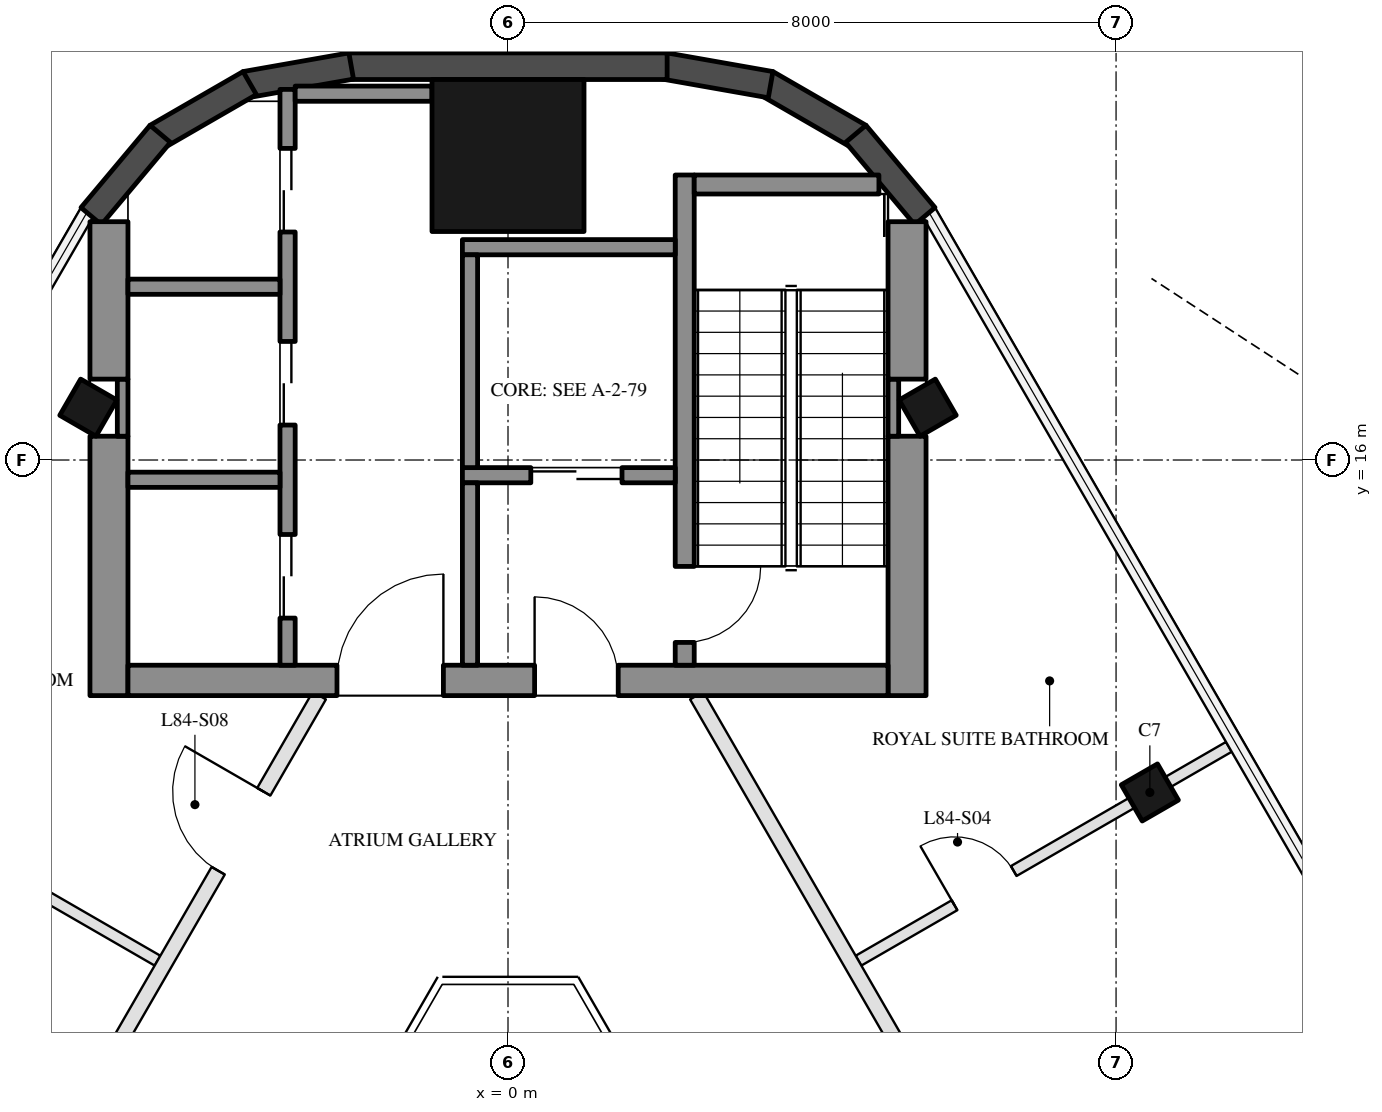
"""IFC4 building model, lengths in metres.
Left out: names, types, materials, properties, quantities, classifications, styles, units other than length and angle.
Written with IfcOpenShell. Run it as: python <this file> out.ifc"""

import sys

from ifc_helpers import new_model, si_unit, direction, frame, frame_2d, origin, origin_2d, place, context, subcontext, project, spatial, rectangle, hollow_rectangle, extrude, boolean, halfspace, element, fill, save


model = new_model("IFC4")
c1 = context("Model", 3, precision=1e-05, world=origin(), true_north=direction((0.0, 1.0)))
c2 = subcontext(c1, "Body", "Model", "MODEL_VIEW")
j1 = project(units=[si_unit("LENGTHUNIT", "METRE"), si_unit("PLANEANGLEUNIT", "RADIAN")], contexts=[c1])
p1 = place(None, origin())
s1 = spatial("IfcSite", under=j1, at=p1, CompositionType="ELEMENT")
p2 = place(p1, origin())
s2 = spatial("IfcBuilding", under=s1, at=p2, CompositionType="ELEMENT")
p3 = place(p2, frame((0.0, 0.0, 338.3)))
s3 = spatial("IfcBuildingStorey", under=s2, at=p3, CompositionType="ELEMENT", Elevation=338.3)
p4 = place(p3, frame((8.445, 11.626, 0.0), z_axis=(0.0, 0.0, 1.0), x_axis=(-0.5, 0.866025403784, 0.0)))
e1 = element("IfcColumn", 1, at=p4, inside=s3, PredefinedType="COLUMN", context=c2, shape_type="SweptSolid", body=[
    boolean("DIFFERENCE", extrude(hollow_rectangle(XDim=0.55, YDim=0.55, WallThickness=0.025, at=origin_2d()), origin(), (0.0, 0.0, 1.0), 5.0), halfspace(frame((0.0, 0.0, 0.02), z_axis=(0.0, 0.0, 1.0), x_axis=(1.0, 0.0, 0.0)), True)),
])
for number, where, z_axis, x_axis in (
    (2, (5.521, 16.689, 0.0), (0.0, 0.0, 1.0), (-0.5, 0.866, 0.0)),
    (3, (-5.521, 16.689, 0.0), (0.0, 0.0, 1.0), (0.5, 0.866, 0.0)),
):
    element("IfcColumn", number, at=place(p3, frame(where, z_axis=z_axis, x_axis=x_axis)), inside=s3, PredefinedType="COLUMN", context=c2, shape_type="SweptSolid", body=[
        boolean("DIFFERENCE", extrude(hollow_rectangle(XDim=0.55, YDim=0.55, WallThickness=0.025, at=origin_2d()), origin(), (0.0, 0.0, 1.0), 5.0), halfspace(frame((0.0, 0.0, 0.024), z_axis=(0.0, 0.0, 1.0), x_axis=(1.0, 0.0, 0.0)), True)),
    ])
p5 = place(p3, frame((0.0, 20.006, 0.0), z_axis=(0.0, 0.0, 1.0), x_axis=(1.0, 0.0, 0.0)))
e4 = element("IfcColumn", 4, at=p5, inside=s3, PredefinedType="COLUMN", context=c2, shape_type="SweptSolid", body=[
    boolean("DIFFERENCE", extrude(hollow_rectangle(XDim=2.0, YDim=2.0, WallThickness=0.05, at=origin_2d()), origin(), (0.0, 0.0, 1.0), 5.0), halfspace(frame((0.0, 0.0, 0.066), z_axis=(0.0, 0.0, 1.0), x_axis=(1.0, 0.0, 0.0)), True)),
])
for number, where, z_axis, x_axis in (
    (5, (4.622, 20.253, 0.0), (0.0, 0.0, 1.0), (-0.866, 0.5, 0.0)),
    (6, (3.455, 20.939, 0.0), (0.0, 0.0, 1.0), (-0.985, 0.174, 0.0)),
):
    element("IfcWall", number, at=place(p3, frame(where, z_axis=z_axis, x_axis=x_axis)), inside=s3, PredefinedType="SOLIDWALL", context=c2, shape_type="SweptSolid", body=[
        extrude(rectangle(XDim=1.414, YDim=0.35, at=frame_2d((0.707, 0.0))), origin(), (0.0, 0.0, 1.0), 4.8),
    ])
p6 = place(p3, frame((2.094, 21.181, 0.0), z_axis=(0.0, 0.0, 1.0), x_axis=(-1.0, 0.0, 0.0)))
e7 = element("IfcWall", 7, at=p6, inside=s3, PredefinedType="SOLIDWALL", context=c2, shape_type="SweptSolid", body=[
    extrude(rectangle(XDim=4.187, YDim=0.35, at=frame_2d((2.094, 0.0))), origin(), (0.0, 0.0, 1.0), 4.8),
])
for number, where, z_axis, x_axis in (
    (8, (-2.063, 21.184, 0.0), (0.0, 0.0, 1.0), (-0.985, -0.174, 0.0)),
    (9, (-3.398, 20.959, 0.0), (0.0, 0.0, 1.0), (-0.866, -0.5, 0.0)),
):
    element("IfcWall", number, at=place(p3, frame(where, z_axis=z_axis, x_axis=x_axis)), inside=s3, PredefinedType="SOLIDWALL", context=c2, shape_type="SweptSolid", body=[
        extrude(rectangle(XDim=1.414, YDim=0.35, at=frame_2d((0.707, 0.0))), origin(), (0.0, 0.0, 1.0), 4.8),
    ])
for number, where, z_axis, x_axis in (
    (10, (-4.576, 20.292, 0.0), (0.0, 0.0, 1.0), (-0.643, -0.766, 0.0)),
    (11, (5.484, 19.209, 0.0), (0.0, 0.0, 1.0), (-0.643, 0.766, 0.0)),
):
    element("IfcWall", number, at=place(p3, frame(where, z_axis=z_axis, x_axis=x_axis)), inside=s3, PredefinedType="SOLIDWALL", context=c2, shape_type="SweptSolid", body=[
        extrude(rectangle(XDim=1.413, YDim=0.35, at=frame_2d((0.707, 0.0))), origin(), (0.0, 0.0, 1.0), 4.8),
    ])
p7 = place(p3, frame((5.25, 12.9, 0.0), z_axis=(0.0, 0.0, 1.0), x_axis=(0.0, 1.0, 0.0)))
e12 = element("IfcWall", 12, at=p7, inside=s3, PredefinedType="SHEAR", context=c2, shape_type="SweptSolid", body=[
    extrude(rectangle(XDim=3.413, YDim=0.5, at=frame_2d((1.707, 0.0))), origin(), (0.0, 0.0, 1.0), 4.8),
])
p8 = place(p3, frame((5.07, 16.313, 0.0), z_axis=(0.0, 0.0, 1.0), x_axis=(0.0, 1.0, 0.0)))
e13 = element("IfcWall", 13, at=p8, inside=s3, PredefinedType="SHEAR", context=c2, shape_type="SweptSolid", body=[
    extrude(rectangle(XDim=0.751, YDim=0.14, at=frame_2d((0.376, 0.0))), origin(), (0.0, 0.0, 1.0), 4.8),
])
p9 = place(p3, frame((5.25, 17.064, 0.0), z_axis=(0.0, 0.0, 1.0), x_axis=(0.0, 1.0, 0.0)))
e14 = element("IfcWall", 14, at=p9, inside=s3, PredefinedType="SHEAR", context=c2, shape_type="SweptSolid", body=[
    extrude(rectangle(XDim=2.071, YDim=0.5, at=frame_2d((1.036, 0.0))), origin(), (0.0, 0.0, 1.0), 4.8),
])
p10 = place(p3, frame((-5.25, 12.9, 0.0), z_axis=(0.0, 0.0, 1.0), x_axis=(0.0, 1.0, 0.0)))
e15 = element("IfcWall", 15, at=p10, inside=s3, PredefinedType="SHEAR", context=c2, shape_type="SweptSolid", body=[
    extrude(rectangle(XDim=3.413, YDim=0.5, at=frame_2d((1.707, 0.0))), origin(), (0.0, 0.0, 1.0), 4.8),
])
p11 = place(p3, frame((-5.07, 16.313, 0.0), z_axis=(0.0, 0.0, 1.0), x_axis=(0.0, 1.0, 0.0)))
e16 = element("IfcWall", 16, at=p11, inside=s3, PredefinedType="SHEAR", context=c2, shape_type="SweptSolid", body=[
    extrude(rectangle(XDim=0.751, YDim=0.14, at=frame_2d((0.376, 0.0))), origin(), (0.0, 0.0, 1.0), 4.8),
])
p12 = place(p3, frame((-5.25, 17.064, 0.0), z_axis=(0.0, 0.0, 1.0), x_axis=(0.0, 1.0, 0.0)))
e17 = element("IfcWall", 17, at=p12, inside=s3, PredefinedType="SHEAR", context=c2, shape_type="SweptSolid", body=[
    extrude(rectangle(XDim=2.071, YDim=0.5, at=frame_2d((1.036, 0.0))), origin(), (0.0, 0.0, 1.0), 4.8),
])
p13 = place(p3, frame((5.0, 13.1, 0.0), z_axis=(0.0, 0.0, 1.0), x_axis=(-1.0, 0.0, 0.0)))
e18 = element("IfcWall", 18, at=p13, inside=s3, PredefinedType="SHEAR", context=c2, shape_type="SweptSolid", body=[
    extrude(rectangle(XDim=10.0, YDim=0.4, at=frame_2d((5.0, 0.0))), origin(), (0.0, 0.0, 1.0), 4.8),
])
p14 = place(p13, frame((3.55, 0.0, 0.0)))
e19 = element("IfcOpeningElement", 19, at=p14, cuts=e18, PredefinedType="OPENING", context=c2, shape_type="SweptSolid", body=[
    extrude(rectangle(XDim=1.1, YDim=2.1, at=frame_2d((0.55, 1.05))), frame((0.0, 0.21, 0.0), z_axis=(0.0, -1.0, 0.0), x_axis=(1.0, 0.0, 0.0)), (0.0, 0.0, 1.0), 0.42),
])
p15 = place(p13, frame((5.85, 0.0, 0.0)))
e20 = element("IfcOpeningElement", 20, at=p15, cuts=e18, PredefinedType="OPENING", context=c2, shape_type="SweptSolid", body=[
    extrude(rectangle(XDim=1.4, YDim=2.1, at=frame_2d((0.7, 1.05))), frame((0.0, 0.21, 0.0), z_axis=(0.0, -1.0, 0.0), x_axis=(1.0, 0.0, 0.0)), (0.0, 0.0, 1.0), 0.42),
])
p16 = place(p3, frame((2.325, 13.3, 0.0), z_axis=(0.0, 0.0, 1.0), x_axis=(0.0, 1.0, 0.0)))
e21 = element("IfcWall", 21, at=p16, inside=s3, PredefinedType="SHEAR", context=c2, shape_type="SweptSolid", body=[
    extrude(rectangle(XDim=6.45, YDim=0.25, at=frame_2d((3.225, 0.0))), origin(), (0.0, 0.0, 1.0), 4.8),
])
p17 = place(p16, frame((0.3, 0.0, 0.0)))
e22 = element("IfcOpeningElement", 22, at=p17, cuts=e21, PredefinedType="OPENING", context=c2, shape_type="SweptSolid", body=[
    extrude(rectangle(XDim=1.0, YDim=2.1, at=frame_2d((0.5, 1.05))), frame((0.0, 0.135, 0.0), z_axis=(0.0, -1.0, 0.0), x_axis=(1.0, 0.0, 0.0)), (0.0, 0.0, 1.0), 0.27),
])
p18 = place(p3, frame((4.88, 19.625, 0.0), z_axis=(0.0, 0.0, 1.0), x_axis=(-1.0, 0.0, 0.0)))
e23 = element("IfcWall", 23, at=p18, inside=s3, PredefinedType="SHEAR", context=c2, shape_type="SweptSolid", body=[
    extrude(rectangle(XDim=2.43, YDim=0.25, at=frame_2d((1.215, 0.0))), origin(), (0.0, 0.0, 1.0), 4.8),
])
p19 = place(p3, frame((2.2, 18.8, 0.0), z_axis=(0.0, 0.0, 1.0), x_axis=(-1.0, 0.0, 0.0)))
e24 = element("IfcWall", 24, at=p19, inside=s3, PredefinedType="SHEAR", context=c2, shape_type="SweptSolid", body=[
    extrude(rectangle(XDim=2.8, YDim=0.2, at=frame_2d((1.4, 0.0))), origin(), (0.0, 0.0, 1.0), 4.8),
])
p20 = place(p3, frame((2.2, 15.8, 0.0), z_axis=(0.0, 0.0, 1.0), x_axis=(-1.0, 0.0, 0.0)))
e25 = element("IfcWall", 25, at=p20, inside=s3, PredefinedType="SHEAR", context=c2, shape_type="SweptSolid", body=[
    extrude(rectangle(XDim=2.8, YDim=0.2, at=frame_2d((1.4, 0.0))), origin(), (0.0, 0.0, 1.0), 4.8),
])
p21 = place(p20, frame((0.7, 0.0, 0.0)))
e26 = element("IfcOpeningElement", 26, at=p21, cuts=e25, PredefinedType="OPENING", context=c2, shape_type="SweptSolid", body=[
    extrude(rectangle(XDim=1.2, YDim=2.1, at=frame_2d((0.6, 1.05))), frame((0.0, 0.11, 0.0), z_axis=(0.0, -1.0, 0.0), x_axis=(1.0, 0.0, 0.0)), (0.0, 0.0, 1.0), 0.22),
])
p22 = place(p3, frame((-0.5, 15.9, 0.0), z_axis=(0.0, 0.0, 1.0), x_axis=(0.0, 1.0, 0.0)))
e27 = element("IfcWall", 27, at=p22, inside=s3, PredefinedType="SHEAR", context=c2, shape_type="SweptSolid", body=[
    extrude(rectangle(XDim=2.8, YDim=0.2, at=frame_2d((1.4, 0.0))), origin(), (0.0, 0.0, 1.0), 4.8),
])
p23 = place(p3, frame((-0.5, 13.3, 0.0), z_axis=(0.0, 0.0, 1.0), x_axis=(0.0, 1.0, 0.0)))
e28 = element("IfcWall", 28, at=p23, inside=s3, PredefinedType="SHEAR", context=c2, shape_type="SweptSolid", body=[
    extrude(rectangle(XDim=2.4, YDim=0.2, at=frame_2d((1.2, 0.0))), origin(), (0.0, 0.0, 1.0), 4.8),
])
p24 = place(p3, frame((-2.9, 13.3, 0.0), z_axis=(0.0, 0.0, 1.0), x_axis=(0.0, 1.0, 0.0)))
e29 = element("IfcWall", 29, at=p24, inside=s3, PredefinedType="SHEAR", context=c2, shape_type="SweptSolid", body=[
    extrude(rectangle(XDim=7.576, YDim=0.2, at=frame_2d((3.788, 0.0))), origin(), (0.0, 0.0, 1.0), 4.8),
])
p25 = place(p24, frame((0.62, 0.0, 0.0)))
e30 = element("IfcOpeningElement", 30, at=p25, cuts=e29, PredefinedType="OPENING", context=c2, shape_type="SweptSolid", body=[
    extrude(rectangle(XDim=1.1, YDim=2.1, at=frame_2d((0.55, 1.05))), frame((0.0, 0.11, 0.0), z_axis=(0.0, -1.0, 0.0), x_axis=(1.0, 0.0, 0.0)), (0.0, 0.0, 1.0), 0.22),
])
p26 = place(p24, frame((3.16, 0.0, 0.0)))
e31 = element("IfcOpeningElement", 31, at=p26, cuts=e29, PredefinedType="OPENING", context=c2, shape_type="SweptSolid", body=[
    extrude(rectangle(XDim=1.1, YDim=2.1, at=frame_2d((0.55, 1.05))), frame((0.0, 0.11, 0.0), z_axis=(0.0, -1.0, 0.0), x_axis=(1.0, 0.0, 0.0)), (0.0, 0.0, 1.0), 0.22),
])
p27 = place(p24, frame((5.7, 0.0, 0.0)))
e32 = element("IfcOpeningElement", 32, at=p27, cuts=e29, PredefinedType="OPENING", context=c2, shape_type="SweptSolid", body=[
    extrude(rectangle(XDim=1.1, YDim=2.1, at=frame_2d((0.55, 1.05))), frame((0.0, 0.11, 0.0), z_axis=(0.0, -1.0, 0.0), x_axis=(1.0, 0.0, 0.0)), (0.0, 0.0, 1.0), 0.22),
])
p28 = place(p3, frame((-1.0, 20.82, 0.0), z_axis=(0.0, 0.0, 1.0), x_axis=(-1.0, 0.0, 0.0)))
e33 = element("IfcWall", 33, at=p28, inside=s3, PredefinedType="SHEAR", context=c2, shape_type="SweptSolid", body=[
    extrude(rectangle(XDim=1.8, YDim=0.2, at=frame_2d((0.9, 0.0))), origin(), (0.0, 0.0, 1.0), 4.8),
])
for number, where, z_axis, x_axis in (
    (34, (-3.0, 15.74, 0.0), (0.0, 0.0, 1.0), (-1.0, 0.0, 0.0)),
    (35, (-3.0, 18.28, 0.0), (0.0, 0.0, 1.0), (-1.0, 0.0, 0.0)),
):
    element("IfcWall", number, at=place(p3, frame(where, z_axis=z_axis, x_axis=x_axis)), inside=s3, PredefinedType="SHEAR", context=c2, shape_type="SweptSolid", body=[
        extrude(rectangle(XDim=2.0, YDim=0.2, at=frame_2d((1.0, 0.0))), origin(), (0.0, 0.0, 1.0), 4.8),
    ])
p29 = place(p3, frame((9.484, 12.226, 0.0), z_axis=(0.0, 0.0, 1.0), x_axis=(-0.866039621134, -0.49997537402, 0.0)))
e36 = element("IfcWall", 36, at=p29, inside=s3, PredefinedType="PARTITIONING", context=c2, shape_type="SweptSolid", body=[
    extrude(rectangle(XDim=5.626, YDim=0.15, at=frame_2d((2.813, 0.0))), origin(), (0.0, 0.0, 1.0), 4.4),
])
p30 = place(p29, frame((3.268, 0.0, 0.0)))
e37 = element("IfcOpeningElement", 37, at=p30, cuts=e36, PredefinedType="OPENING", context=c2, shape_type="SweptSolid", body=[
    extrude(rectangle(XDim=0.9, YDim=2.1, at=frame_2d((0.45, 1.05))), frame((0.0, 0.085, 0.0), z_axis=(0.0, -1.0, 0.0), x_axis=(1.0, 0.0, 0.0)), (0.0, 0.0, 1.0), 0.17),
])
p31 = place(p3, frame((12.413, -4.3, 0.0), z_axis=(0.0, 0.0, 1.0), x_axis=(-0.50000478328, 0.866022642139, 0.0)))
e38 = element("IfcWall", 38, at=p31, inside=s3, PredefinedType="PARTITIONING", context=c2, shape_type="SweptSolid", body=[
    extrude(rectangle(XDim=19.861, YDim=0.2, at=frame_2d((9.931, 0.0))), origin(), (0.0, 0.0, 1.0), 4.4),
])
p32 = place(p31, frame((4.384, 0.0, 0.0)))
e39 = element("IfcOpeningElement", 39, at=p32, cuts=e38, PredefinedType="OPENING", context=c2, shape_type="SweptSolid", body=[
    extrude(rectangle(XDim=1.2, YDim=2.1, at=frame_2d((0.6, 1.05))), frame((0.0, 0.11, 0.0), z_axis=(0.0, -1.0, 0.0), x_axis=(1.0, 0.0, 0.0)), (0.0, 0.0, 1.0), 0.22),
])
p33 = place(p31, frame((12.354, 0.0, 0.0)))
e40 = element("IfcOpeningElement", 40, at=p33, cuts=e38, PredefinedType="OPENING", context=c2, shape_type="SweptSolid", body=[
    extrude(rectangle(XDim=1.0, YDim=2.1, at=frame_2d((0.5, 1.05))), frame((0.0, 0.11, 0.0), z_axis=(0.0, -1.0, 0.0), x_axis=(1.0, 0.0, 0.0)), (0.0, 0.0, 1.0), 0.22),
])
p34 = place(p3, frame((-9.484, 12.226, 0.0), z_axis=(0.0, 0.0, 1.0), x_axis=(0.866039621134, -0.49997537402, 0.0)))
e41 = element("IfcWall", 41, at=p34, inside=s3, PredefinedType="PARTITIONING", context=c2, shape_type="SweptSolid", body=[
    extrude(rectangle(XDim=5.626, YDim=0.15, at=frame_2d((2.813, 0.0))), origin(), (0.0, 0.0, 1.0), 4.4),
])
p35 = place(p3, frame((-2.482, 12.9, 0.0), z_axis=(0.0, 0.0, 1.0), x_axis=(-0.50000478328, -0.866022642139, 0.0)))
e42 = element("IfcWall", 42, at=p35, inside=s3, PredefinedType="PARTITIONING", context=c2, shape_type="SweptSolid", body=[
    extrude(rectangle(XDim=19.861, YDim=0.2, at=frame_2d((9.931, 0.0))), origin(), (0.0, 0.0, 1.0), 4.4),
])
p36 = place(p35, frame((1.461, 0.0, 0.0)))
e43 = element("IfcOpeningElement", 43, at=p36, cuts=e42, PredefinedType="OPENING", context=c2, shape_type="SweptSolid", body=[
    extrude(rectangle(XDim=1.2, YDim=2.1, at=frame_2d((0.6, 1.05))), frame((0.0, 0.11, 0.0), z_axis=(0.0, -1.0, 0.0), x_axis=(1.0, 0.0, 0.0)), (0.0, 0.0, 1.0), 0.22),
])
p37 = place(p35, frame((15.778, 0.0, 0.0)))
e44 = element("IfcOpeningElement", 44, at=p37, cuts=e42, PredefinedType="OPENING", context=c2, shape_type="SweptSolid", body=[
    extrude(rectangle(XDim=1.2, YDim=2.1, at=frame_2d((0.6, 1.05))), frame((0.0, 0.11, 0.0), z_axis=(0.0, -1.0, 0.0), x_axis=(1.0, 0.0, 0.0)), (0.0, 0.0, 1.0), 0.22),
])
p38 = place(p35, frame((8.008, 0.0, 0.0)))
e45 = element("IfcOpeningElement", 45, at=p38, cuts=e42, PredefinedType="OPENING", context=c2, shape_type="SweptSolid", body=[
    extrude(rectangle(XDim=1.0, YDim=2.1, at=frame_2d((0.5, 1.05))), frame((0.0, 0.11, 0.0), z_axis=(0.0, -1.0, 0.0), x_axis=(1.0, 0.0, 0.0)), (0.0, 0.0, 1.0), 0.22),
])
p39 = place(p21, origin())
e46 = element("IfcDoor", 46, at=p39, inside=s3, OperationType="DOUBLE_DOOR_SLIDING", PredefinedType="DOOR", context=c2, shape_type="SweptSolid", body=[
    extrude(rectangle(XDim=1.2, YDim=2.1, at=frame_2d((0.6, 1.05))), frame((0.0, 0.025, 0.0), z_axis=(0.0, -1.0, 0.0), x_axis=(1.0, 0.0, 0.0)), (0.0, 0.0, 1.0), 0.05),
])
fill(e26, e46)
p40 = place(p25, origin())
e47 = element("IfcDoor", 47, at=p40, inside=s3, OperationType="DOUBLE_DOOR_SLIDING", PredefinedType="DOOR", context=c2, shape_type="SweptSolid", body=[
    extrude(rectangle(XDim=1.1, YDim=2.1, at=frame_2d((0.55, 1.05))), frame((0.0, 0.025, 0.0), z_axis=(0.0, -1.0, 0.0), x_axis=(1.0, 0.0, 0.0)), (0.0, 0.0, 1.0), 0.05),
])
fill(e30, e47)
p41 = place(p26, origin())
e48 = element("IfcDoor", 48, at=p41, inside=s3, OperationType="DOUBLE_DOOR_SLIDING", PredefinedType="DOOR", context=c2, shape_type="SweptSolid", body=[
    extrude(rectangle(XDim=1.1, YDim=2.1, at=frame_2d((0.55, 1.05))), frame((0.0, 0.025, 0.0), z_axis=(0.0, -1.0, 0.0), x_axis=(1.0, 0.0, 0.0)), (0.0, 0.0, 1.0), 0.05),
])
fill(e31, e48)
p42 = place(p27, origin())
e49 = element("IfcDoor", 49, at=p42, inside=s3, OperationType="DOUBLE_DOOR_SLIDING", PredefinedType="DOOR", context=c2, shape_type="SweptSolid", body=[
    extrude(rectangle(XDim=1.1, YDim=2.1, at=frame_2d((0.55, 1.05))), frame((0.0, 0.025, 0.0), z_axis=(0.0, -1.0, 0.0), x_axis=(1.0, 0.0, 0.0)), (0.0, 0.0, 1.0), 0.05),
])
fill(e32, e49)
p43 = place(p14, frame((1.1, 0.0, 0.0), z_axis=(0.0, 0.0, 1.0), x_axis=(-1.0, 0.0, 0.0)))
e50 = element("IfcDoor", 50, at=p43, inside=s3, OperationType="SINGLE_SWING_LEFT", PredefinedType="DOOR", context=c2, shape_type="SweptSolid", body=[
    extrude(rectangle(XDim=1.1, YDim=2.1, at=frame_2d((0.55, 1.05))), frame((0.0, 0.025, 0.0), z_axis=(0.0, -1.0, 0.0), x_axis=(1.0, 0.0, 0.0)), (0.0, 0.0, 1.0), 0.05),
])
fill(e19, e50)
p44 = place(p15, frame((1.4, 0.0, 0.0), z_axis=(0.0, 0.0, 1.0), x_axis=(-1.0, 0.0, 0.0)))
e51 = element("IfcDoor", 51, at=p44, inside=s3, OperationType="DOUBLE_DOOR_SINGLE_SWING", PredefinedType="DOOR", context=c2, shape_type="SweptSolid", body=[
    extrude(rectangle(XDim=1.4, YDim=2.1, at=frame_2d((0.7, 1.05))), frame((0.0, 0.025, 0.0), z_axis=(0.0, -1.0, 0.0), x_axis=(1.0, 0.0, 0.0)), (0.0, 0.0, 1.0), 0.05),
])
fill(e20, e51)
p45 = place(p17, frame((1.0, 0.0, 0.0), z_axis=(0.0, 0.0, 1.0), x_axis=(-1.0, 0.0, 0.0)))
e52 = element("IfcDoor", 52, at=p45, inside=s3, OperationType="SINGLE_SWING_LEFT", PredefinedType="DOOR", context=c2, shape_type="SweptSolid", body=[
    extrude(rectangle(XDim=1.0, YDim=2.1, at=frame_2d((0.5, 1.05))), frame((0.0, 0.025, 0.0), z_axis=(0.0, -1.0, 0.0), x_axis=(1.0, 0.0, 0.0)), (0.0, 0.0, 1.0), 0.05),
])
fill(e22, e52)
p46 = place(p30, frame((0.9, 0.0, 0.0), z_axis=(0.0, 0.0, 1.0), x_axis=(-1.0, 0.0, 0.0)))
e53 = element("IfcDoor", 53, at=p46, inside=s3, OperationType="SINGLE_SWING_LEFT", PredefinedType="DOOR", context=c2, shape_type="SweptSolid", body=[
    extrude(rectangle(XDim=0.9, YDim=2.1, at=frame_2d((0.45, 1.05))), frame((0.0, 0.025, 0.0), z_axis=(0.0, -1.0, 0.0), x_axis=(1.0, 0.0, 0.0)), (0.0, 0.0, 1.0), 0.05),
])
fill(e37, e53)
p47 = place(p36, frame((1.2, 0.0, 0.0), z_axis=(0.0, 0.0, 1.0), x_axis=(-1.0, 0.0, 0.0)))
e54 = element("IfcDoor", 54, at=p47, inside=s3, OperationType="SINGLE_SWING_RIGHT", PredefinedType="DOOR", context=c2, shape_type="SweptSolid", body=[
    extrude(rectangle(XDim=1.2, YDim=2.1, at=frame_2d((0.6, 1.05))), frame((0.0, 0.025, 0.0), z_axis=(0.0, -1.0, 0.0), x_axis=(1.0, 0.0, 0.0)), (0.0, 0.0, 1.0), 0.05),
])
fill(e43, e54)
save(model, sys.argv[1])
